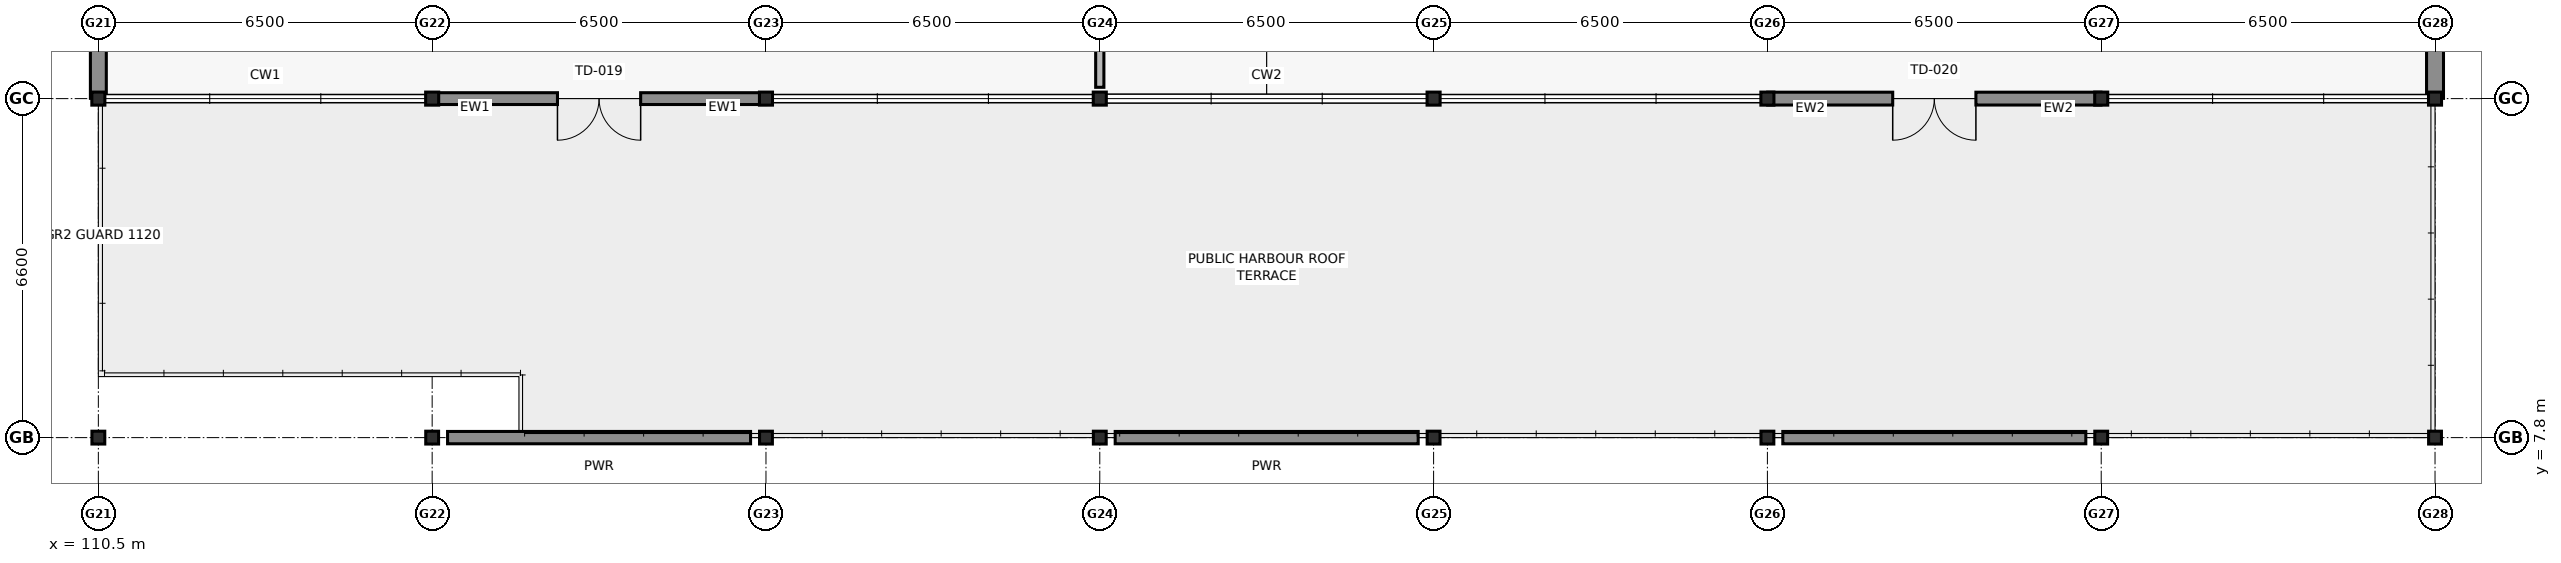
"""IFC4 building model, lengths in metres.
Left out: names, types, materials, properties, quantities, classifications, styles, units other than length and angle.
Written with IfcOpenShell. Run it as: python <this file> out.ifc"""

import sys

from ifc_helpers import new_model, si_unit, direction, frame, frame_2d, origin, origin_2d, place, context, subcontext, project, spatial, rectangle, hollow_rectangle, i_section, extrude, element, fill, save


model = new_model("IFC4")
c1 = context("Model", 3, precision=1e-05, world=origin(), true_north=direction((0.0, 1.0)))
c2 = subcontext(c1, "Body", "Model", "MODEL_VIEW")
j1 = project(units=[si_unit("LENGTHUNIT", "METRE"), si_unit("PLANEANGLEUNIT", "RADIAN")], contexts=[c1])
p1 = place(None, origin())
s1 = spatial("IfcSite", under=j1, at=p1, CompositionType="ELEMENT")
p2 = place(p1, origin())
s2 = spatial("IfcBuilding", under=s1, at=p2, CompositionType="ELEMENT")
p3 = place(p2, frame((0.0, 0.0, 21.3)))
s3 = spatial("IfcBuildingStorey", under=s2, at=p3, CompositionType="ELEMENT", Elevation=21.3)
p4 = place(p3, frame((110.5, 7.8, 0.0), z_axis=(0.0, 0.0, 1.0), x_axis=(1.0, 0.0, 0.0)))
e1 = element("IfcColumn", 1, at=p4, inside=s3, PredefinedType="COLUMN", context=c2, shape_type="SweptSolid", body=[
    extrude(hollow_rectangle(XDim=0.25, YDim=0.25, WallThickness=0.012, at=origin_2d()), origin(), (0.0, 0.0, 1.0), 3.9),
])
p5 = place(p3, frame((110.5, 14.4, 0.0), z_axis=(0.0, 0.0, 1.0), x_axis=(1.0, 0.0, 0.0)))
e2 = element("IfcColumn", 2, at=p5, inside=s3, PredefinedType="COLUMN", context=c2, shape_type="SweptSolid", body=[
    extrude(i_section(OverallWidth=0.254, OverallDepth=0.254, WebThickness=0.009, FlangeThickness=0.014, FilletRadius=0.013, at=origin_2d()), origin(), (0.0, 0.0, 1.0), 3.9),
])
p6 = place(p3, frame((117.0, 7.8, 0.0), z_axis=(0.0, 0.0, 1.0), x_axis=(1.0, 0.0, 0.0)))
e3 = element("IfcColumn", 3, at=p6, inside=s3, PredefinedType="COLUMN", context=c2, shape_type="SweptSolid", body=[
    extrude(hollow_rectangle(XDim=0.25, YDim=0.25, WallThickness=0.012, at=origin_2d()), origin(), (0.0, 0.0, 1.0), 3.9),
])
p7 = place(p3, frame((117.0, 14.4, 0.0), z_axis=(0.0, 0.0, 1.0), x_axis=(1.0, 0.0, 0.0)))
e4 = element("IfcColumn", 4, at=p7, inside=s3, PredefinedType="COLUMN", context=c2, shape_type="SweptSolid", body=[
    extrude(i_section(OverallWidth=0.254, OverallDepth=0.254, WebThickness=0.009, FlangeThickness=0.014, FilletRadius=0.013, at=origin_2d()), origin(), (0.0, 0.0, 1.0), 3.9),
])
p8 = place(p3, frame((123.5, 7.8, 0.0), z_axis=(0.0, 0.0, 1.0), x_axis=(1.0, 0.0, 0.0)))
e5 = element("IfcColumn", 5, at=p8, inside=s3, PredefinedType="COLUMN", context=c2, shape_type="SweptSolid", body=[
    extrude(hollow_rectangle(XDim=0.25, YDim=0.25, WallThickness=0.012, at=origin_2d()), origin(), (0.0, 0.0, 1.0), 3.9),
])
p9 = place(p3, frame((123.5, 14.4, 0.0), z_axis=(0.0, 0.0, 1.0), x_axis=(1.0, 0.0, 0.0)))
e6 = element("IfcColumn", 6, at=p9, inside=s3, PredefinedType="COLUMN", context=c2, shape_type="SweptSolid", body=[
    extrude(i_section(OverallWidth=0.254, OverallDepth=0.254, WebThickness=0.009, FlangeThickness=0.014, FilletRadius=0.013, at=origin_2d()), origin(), (0.0, 0.0, 1.0), 3.9),
])
p10 = place(p3, frame((130.0, 7.8, 0.0), z_axis=(0.0, 0.0, 1.0), x_axis=(1.0, 0.0, 0.0)))
e7 = element("IfcColumn", 7, at=p10, inside=s3, PredefinedType="COLUMN", context=c2, shape_type="SweptSolid", body=[
    extrude(hollow_rectangle(XDim=0.25, YDim=0.25, WallThickness=0.012, at=origin_2d()), origin(), (0.0, 0.0, 1.0), 3.9),
])
p11 = place(p3, frame((130.0, 14.4, 0.0), z_axis=(0.0, 0.0, 1.0), x_axis=(1.0, 0.0, 0.0)))
e8 = element("IfcColumn", 8, at=p11, inside=s3, PredefinedType="COLUMN", context=c2, shape_type="SweptSolid", body=[
    extrude(i_section(OverallWidth=0.254, OverallDepth=0.254, WebThickness=0.009, FlangeThickness=0.014, FilletRadius=0.013, at=origin_2d()), origin(), (0.0, 0.0, 1.0), 3.9),
])
p12 = place(p3, frame((136.5, 7.8, 0.0), z_axis=(0.0, 0.0, 1.0), x_axis=(1.0, 0.0, 0.0)))
e9 = element("IfcColumn", 9, at=p12, inside=s3, PredefinedType="COLUMN", context=c2, shape_type="SweptSolid", body=[
    extrude(hollow_rectangle(XDim=0.25, YDim=0.25, WallThickness=0.012, at=origin_2d()), origin(), (0.0, 0.0, 1.0), 3.9),
])
p13 = place(p3, frame((136.5, 14.4, 0.0), z_axis=(0.0, 0.0, 1.0), x_axis=(1.0, 0.0, 0.0)))
e10 = element("IfcColumn", 10, at=p13, inside=s3, PredefinedType="COLUMN", context=c2, shape_type="SweptSolid", body=[
    extrude(i_section(OverallWidth=0.254, OverallDepth=0.254, WebThickness=0.009, FlangeThickness=0.014, FilletRadius=0.013, at=origin_2d()), origin(), (0.0, 0.0, 1.0), 3.9),
])
p14 = place(p3, frame((143.0, 7.8, 0.0), z_axis=(0.0, 0.0, 1.0), x_axis=(1.0, 0.0, 0.0)))
e11 = element("IfcColumn", 11, at=p14, inside=s3, PredefinedType="COLUMN", context=c2, shape_type="SweptSolid", body=[
    extrude(hollow_rectangle(XDim=0.25, YDim=0.25, WallThickness=0.012, at=origin_2d()), origin(), (0.0, 0.0, 1.0), 3.9),
])
p15 = place(p3, frame((143.0, 14.4, 0.0), z_axis=(0.0, 0.0, 1.0), x_axis=(1.0, 0.0, 0.0)))
e12 = element("IfcColumn", 12, at=p15, inside=s3, PredefinedType="COLUMN", context=c2, shape_type="SweptSolid", body=[
    extrude(i_section(OverallWidth=0.254, OverallDepth=0.254, WebThickness=0.009, FlangeThickness=0.014, FilletRadius=0.013, at=origin_2d()), origin(), (0.0, 0.0, 1.0), 3.9),
])
p16 = place(p3, frame((149.5, 7.8, 0.0), z_axis=(0.0, 0.0, 1.0), x_axis=(1.0, 0.0, 0.0)))
e13 = element("IfcColumn", 13, at=p16, inside=s3, PredefinedType="COLUMN", context=c2, shape_type="SweptSolid", body=[
    extrude(hollow_rectangle(XDim=0.25, YDim=0.25, WallThickness=0.012, at=origin_2d()), origin(), (0.0, 0.0, 1.0), 3.9),
])
p17 = place(p3, frame((149.5, 14.4, 0.0), z_axis=(0.0, 0.0, 1.0), x_axis=(1.0, 0.0, 0.0)))
e14 = element("IfcColumn", 14, at=p17, inside=s3, PredefinedType="COLUMN", context=c2, shape_type="SweptSolid", body=[
    extrude(i_section(OverallWidth=0.254, OverallDepth=0.254, WebThickness=0.009, FlangeThickness=0.014, FilletRadius=0.013, at=origin_2d()), origin(), (0.0, 0.0, 1.0), 3.9),
])
p18 = place(p3, frame((156.0, 7.8, 0.0), z_axis=(0.0, 0.0, 1.0), x_axis=(1.0, 0.0, 0.0)))
e15 = element("IfcColumn", 15, at=p18, inside=s3, PredefinedType="COLUMN", context=c2, shape_type="SweptSolid", body=[
    extrude(hollow_rectangle(XDim=0.25, YDim=0.25, WallThickness=0.012, at=origin_2d()), origin(), (0.0, 0.0, 1.0), 3.9),
])
p19 = place(p3, frame((156.0, 14.4, 0.0), z_axis=(0.0, 0.0, 1.0), x_axis=(1.0, 0.0, 0.0)))
e16 = element("IfcColumn", 16, at=p19, inside=s3, PredefinedType="COLUMN", context=c2, shape_type="SweptSolid", body=[
    extrude(i_section(OverallWidth=0.254, OverallDepth=0.254, WebThickness=0.009, FlangeThickness=0.014, FilletRadius=0.013, at=origin_2d()), origin(), (0.0, 0.0, 1.0), 3.9),
])
p20 = place(p3, frame((123.495, 14.4, 0.0), z_axis=(0.0, 0.0, 1.0), x_axis=(-1.0, 0.0, 0.0)))
e17 = element("IfcWall", 17, at=p20, inside=s3, PredefinedType="SOLIDWALL", context=c2, shape_type="SweptSolid", body=[
    extrude(rectangle(XDim=6.49, YDim=0.23, at=frame_2d((3.245, 0.0))), origin(), (0.0, 0.0, 1.0), 3.02),
])
p21 = place(p20, frame((2.435, 0.0, 0.0)))
e18 = element("IfcOpeningElement", 18, at=p21, cuts=e17, PredefinedType="OPENING", context=c2, shape_type="SweptSolid", body=[
    extrude(rectangle(XDim=1.62, YDim=2.18, at=frame_2d((0.81, 1.09))), frame((0.0, 0.125, 0.0), z_axis=(0.0, -1.0, 0.0), x_axis=(1.0, 0.0, 0.0)), (0.0, 0.0, 1.0), 0.25),
])
p22 = place(p3, frame((149.495, 14.4, 0.0), z_axis=(0.0, 0.0, 1.0), x_axis=(-1.0, 0.0, 0.0)))
e19 = element("IfcWall", 19, at=p22, inside=s3, PredefinedType="SOLIDWALL", context=c2, shape_type="SweptSolid", body=[
    extrude(rectangle(XDim=6.49, YDim=0.25, at=frame_2d((3.245, 0.0))), origin(), (0.0, 0.0, 1.0), 3.02),
])
p23 = place(p22, frame((2.435, 0.0, 0.0)))
e20 = element("IfcOpeningElement", 20, at=p23, cuts=e19, PredefinedType="OPENING", context=c2, shape_type="SweptSolid", body=[
    extrude(rectangle(XDim=1.62, YDim=2.18, at=frame_2d((0.81, 1.09))), frame((0.0, 0.135, 0.0), z_axis=(0.0, -1.0, 0.0), x_axis=(1.0, 0.0, 0.0)), (0.0, 0.0, 1.0), 0.27),
])
p24 = place(p3, frame((110.5, 14.405, 0.0), z_axis=(0.0, 0.0, 1.0), x_axis=(0.0, 1.0, 0.0)))
e21 = element("IfcWall", 21, at=p24, inside=s3, PredefinedType="SOLIDWALL", context=c2, shape_type="SweptSolid", body=[
    extrude(rectangle(XDim=6.59, YDim=0.31, at=frame_2d((3.295, 0.0))), origin(), (0.0, 0.0, 1.0), 3.02),
])
p25 = place(p24, frame((0.988, 0.0, 0.8)))
e22 = element("IfcOpeningElement", 22, at=p25, cuts=e21, PredefinedType="OPENING", context=c2, shape_type="SweptSolid", body=[
    extrude(rectangle(XDim=2.45, YDim=1.95, at=frame_2d((1.225, 0.975))), frame((0.0, 0.165, 0.0), z_axis=(0.0, -1.0, 0.0), x_axis=(1.0, 0.0, 0.0)), (0.0, 0.0, 1.0), 0.33),
])
p26 = place(p3, frame((156.0, 20.995, 0.0), z_axis=(0.0, 0.0, 1.0), x_axis=(0.0, -1.0, 0.0)))
e23 = element("IfcWall", 23, at=p26, inside=s3, PredefinedType="SOLIDWALL", context=c2, shape_type="SweptSolid", body=[
    extrude(rectangle(XDim=6.59, YDim=0.33, at=frame_2d((3.295, 0.0))), origin(), (0.0, 0.0, 1.0), 3.02),
])
p27 = place(p26, frame((3.177, 0.0, 0.72)))
e24 = element("IfcOpeningElement", 24, at=p27, cuts=e23, PredefinedType="OPENING", context=c2, shape_type="SweptSolid", body=[
    extrude(rectangle(XDim=2.4, YDim=2.1, at=frame_2d((1.2, 1.05))), frame((0.0, 0.175, 0.0), z_axis=(0.0, -1.0, 0.0), x_axis=(1.0, 0.0, 0.0)), (0.0, 0.0, 1.0), 0.35),
])
for number, where, z_axis, x_axis in (
    (25, (123.2, 7.8, 0.0), (0.0, 0.0, 1.0), (-1.0, 0.0, 0.0)),
    (26, (136.2, 7.8, 0.0), (0.0, 0.0, 1.0), (-1.0, 0.0, 0.0)),
    (27, (149.2, 7.8, 0.0), (0.0, 0.0, 1.0), (-1.0, 0.0, 0.0)),
):
    element("IfcWall", number, at=place(p3, frame(where, z_axis=z_axis, x_axis=x_axis)), inside=s3, PredefinedType="PARAPET", context=c2, shape_type="SweptSolid", body=[
        extrude(rectangle(XDim=5.9, YDim=0.24, at=frame_2d((2.95, 0.0))), origin(), (0.0, 0.0, 1.0), 1.15),
    ])
p28 = place(p3, frame((130.0, 14.62, 0.0), z_axis=(0.0, 0.0, 1.0), x_axis=(0.0, 1.0, 0.0)))
e28 = element("IfcWall", 28, at=p28, inside=s3, PredefinedType="PARTITIONING", context=c2, shape_type="SweptSolid", body=[
    extrude(rectangle(XDim=3.96, YDim=0.16, at=frame_2d((1.98, 0.0))), origin(), (0.0, 0.0, 1.0), 3.0),
])
p29 = place(p21, origin())
e29 = element("IfcDoor", 29, at=p29, inside=s3, OperationType="DOUBLE_DOOR_SINGLE_SWING", PredefinedType="DOOR", context=c2, shape_type="SweptSolid", body=[
    extrude(rectangle(XDim=1.62, YDim=2.18, at=frame_2d((0.81, 1.09))), frame((0.0, 0.025, 0.0), z_axis=(0.0, -1.0, 0.0), x_axis=(1.0, 0.0, 0.0)), (0.0, 0.0, 1.0), 0.05),
])
fill(e18, e29)
p30 = place(p23, origin())
e30 = element("IfcDoor", 30, at=p30, inside=s3, OperationType="DOUBLE_DOOR_SINGLE_SWING", PredefinedType="DOOR", context=c2, shape_type="SweptSolid", body=[
    extrude(rectangle(XDim=1.62, YDim=2.18, at=frame_2d((0.81, 1.09))), frame((0.0, 0.025, 0.0), z_axis=(0.0, -1.0, 0.0), x_axis=(1.0, 0.0, 0.0)), (0.0, 0.0, 1.0), 0.05),
])
fill(e20, e30)
save(model, sys.argv[1])
